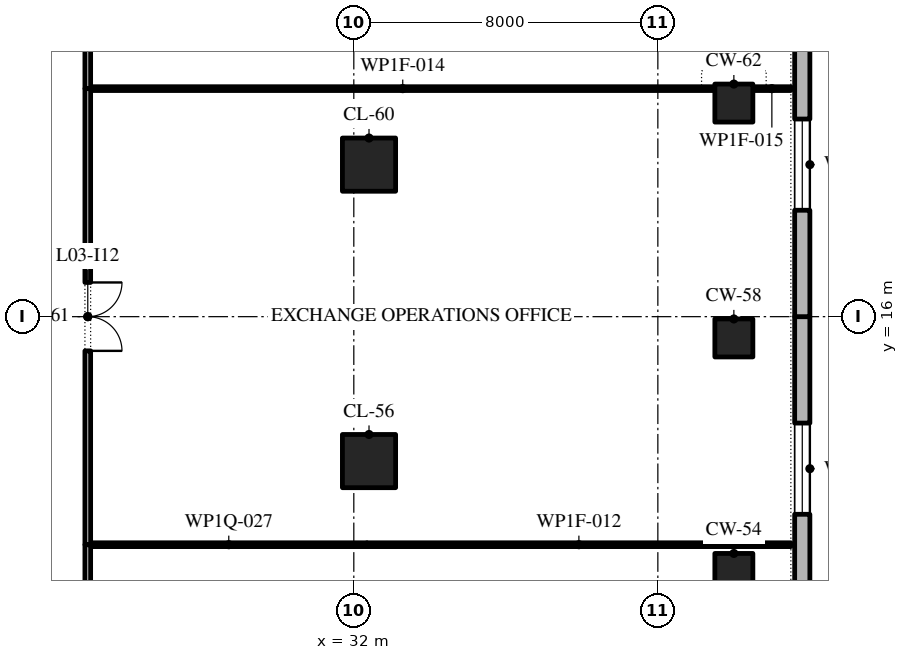
"""IFC4 building model, lengths in metres.
Left out: names, types, materials, properties, quantities, classifications, styles, units other than length and angle.
Written with IfcOpenShell. Run it as: python <this file> out.ifc"""

import sys

from ifc_helpers import new_model, si_unit, direction, frame, frame_2d, origin, origin_2d, place, context, subcontext, project, spatial, polyline, rectangle, outline, extrude, element, fill, save


model = new_model("IFC4")
c1 = context("Model", 3, precision=1e-05, world=origin(), true_north=direction((0.0, 1.0)))
c2 = subcontext(c1, "Body", "Model", "MODEL_VIEW")
j1 = project(units=[si_unit("LENGTHUNIT", "METRE"), si_unit("PLANEANGLEUNIT", "RADIAN")], contexts=[c1])
p1 = place(None, origin())
s1 = spatial("IfcSite", under=j1, at=p1, CompositionType="ELEMENT")
p2 = place(p1, origin())
s2 = spatial("IfcBuilding", under=s1, at=p2, CompositionType="ELEMENT")
p3 = place(p2, frame((0.0, 0.0, 19.2)))
s3 = spatial("IfcBuildingStorey", under=s2, at=p3, CompositionType="ELEMENT", Elevation=19.2)
p4 = place(p3, frame((42.0, 9.27, 0.0), z_axis=(0.0, 0.0, 1.0), x_axis=(1.0, 0.0, 0.0)))
e1 = element("IfcColumn", 1, at=p4, inside=s3, PredefinedType="COLUMN", context=c2, shape_type="SweptSolid", body=[
    extrude(rectangle(XDim=1.0, YDim=1.0, at=origin_2d()), origin(), (0.0, 0.0, 1.0), 4.8),
])
p5 = place(p3, frame((32.4, 12.2, 0.0), z_axis=(0.0, 0.0, 1.0), x_axis=(1.0, 0.0, 0.0)))
e2 = element("IfcColumn", 2, at=p5, inside=s3, PredefinedType="COLUMN", context=c2, shape_type="SweptSolid", body=[
    extrude(rectangle(XDim=1.4, YDim=1.4, at=origin_2d()), origin(), (0.0, 0.0, 1.0), 4.8),
])
p6 = place(p3, frame((42.0, 15.44, 0.0), z_axis=(0.0, 0.0, 1.0), x_axis=(1.0, 0.0, 0.0)))
e3 = element("IfcColumn", 3, at=p6, inside=s3, PredefinedType="COLUMN", context=c2, shape_type="SweptSolid", body=[
    extrude(rectangle(XDim=1.0, YDim=1.0, at=origin_2d()), origin(), (0.0, 0.0, 1.0), 4.8),
])
p7 = place(p3, frame((32.4, 20.0, 0.0), z_axis=(0.0, 0.0, 1.0), x_axis=(1.0, 0.0, 0.0)))
e4 = element("IfcColumn", 4, at=p7, inside=s3, PredefinedType="COLUMN", context=c2, shape_type="SweptSolid", body=[
    extrude(rectangle(XDim=1.4, YDim=1.4, at=origin_2d()), origin(), (0.0, 0.0, 1.0), 4.8),
])
p8 = place(p3, frame((42.0, 21.62, 0.0), z_axis=(0.0, 0.0, 1.0), x_axis=(1.0, 0.0, 0.0)))
e5 = element("IfcColumn", 5, at=p8, inside=s3, PredefinedType="COLUMN", context=c2, shape_type="SweptSolid", body=[
    extrude(rectangle(XDim=1.0, YDim=1.0, at=origin_2d()), origin(), (0.0, 0.0, 1.0), 4.8),
])
p9 = place(p3, frame((43.8, 8.0, 0.0), z_axis=(0.0, 0.0, 1.0), x_axis=(0.0, 1.0, 0.0)))
e6 = element("IfcWall", 6, at=p9, inside=s3, PredefinedType="STANDARD", context=c2, shape_type="SweptSolid", body=[
    extrude(rectangle(XDim=8.0, YDim=0.4, at=frame_2d((4.0, 0.0))), origin(), (0.0, 0.0, 1.0), 4.5),
])
p10 = place(p9, frame((2.8, 0.0, 0.9)))
e7 = element("IfcOpeningElement", 7, at=p10, cuts=e6, PredefinedType="OPENING", context=c2, shape_type="SweptSolid", body=[
    extrude(outline(polyline([(0.0, 0.0), (2.4, 0.0), (2.4, 1.5), (2.378, 1.758), (2.313, 2.009), (2.207, 2.245), (2.063, 2.46), (1.885, 2.648), (1.677, 2.804), (1.447, 2.922), (1.2, 3.0), (0.953, 2.922), (0.722, 2.804), (0.515, 2.648), (0.337, 2.46), (0.193, 2.245), (0.087, 2.009), (0.022, 1.758), (0.0, 1.5), (0.0, 0.0)])), frame((0.0, 0.21, 0.0), z_axis=(0.0, -1.0, 0.0), x_axis=(1.0, 0.0, 0.0)), (0.0, 0.0, 1.0), 0.42),
])
p11 = place(p3, frame((43.8, 16.0, 0.0), z_axis=(0.0, 0.0, 1.0), x_axis=(0.0, 1.0, 0.0)))
e8 = element("IfcWall", 8, at=p11, inside=s3, PredefinedType="STANDARD", context=c2, shape_type="SweptSolid", body=[
    extrude(rectangle(XDim=8.0, YDim=0.4, at=frame_2d((4.0, 0.0))), origin(), (0.0, 0.0, 1.0), 4.5),
])
p12 = place(p11, frame((2.8, 0.0, 0.9)))
e9 = element("IfcOpeningElement", 9, at=p12, cuts=e8, PredefinedType="OPENING", context=c2, shape_type="SweptSolid", body=[
    extrude(outline(polyline([(0.0, 0.0), (2.4, 0.0), (2.4, 1.5), (2.378, 1.758), (2.313, 2.009), (2.207, 2.245), (2.063, 2.46), (1.885, 2.648), (1.677, 2.804), (1.447, 2.922), (1.2, 3.0), (0.953, 2.922), (0.722, 2.804), (0.515, 2.648), (0.337, 2.46), (0.193, 2.245), (0.087, 2.009), (0.022, 1.758), (0.0, 1.5), (0.0, 0.0)])), frame((0.0, 0.21, 0.0), z_axis=(0.0, -1.0, 0.0), x_axis=(1.0, 0.0, 0.0)), (0.0, 0.0, 1.0), 0.42),
])
p13 = place(p3, frame((25.075, 10.0, 0.0), z_axis=(0.0, 0.0, 1.0), x_axis=(1.0, 0.0, 0.0)))
e10 = element("IfcWall", 10, at=p13, inside=s3, PredefinedType="PARTITIONING", context=c2, shape_type="SweptSolid", body=[
    extrude(rectangle(XDim=7.27, YDim=0.1, at=frame_2d((3.635, 0.0))), origin(), (0.0, 0.0, 1.0), 3.964),
])
p14 = place(p3, frame((25.075, 22.0, 0.0), z_axis=(0.0, 0.0, 1.0), x_axis=(1.0, 0.0, 0.0)))
e11 = element("IfcWall", 11, at=p14, inside=s3, PredefinedType="PARTITIONING", context=c2, shape_type="SweptSolid", body=[
    extrude(rectangle(XDim=16.425, YDim=0.1, at=frame_2d((8.212, 0.0))), origin(), (0.0, 0.0, 1.0), 4.5),
])
p15 = place(p3, frame((42.5, 22.0, 0.0), z_axis=(0.0, 0.0, 1.0), x_axis=(1.0, 0.0, 0.0)))
e12 = element("IfcWall", 12, at=p15, inside=s3, PredefinedType="PARTITIONING", context=c2, shape_type="SweptSolid", body=[
    extrude(rectangle(XDim=1.0, YDim=0.1, at=frame_2d((0.5, 0.0))), origin(), (0.0, 0.0, 1.0), 4.5),
])
p16 = place(p3, frame((25.0, -4.0, 0.0), z_axis=(0.0, 0.0, 1.0), x_axis=(0.0, 1.0, 0.0)))
e13 = element("IfcWall", 13, at=p16, inside=s3, PredefinedType="PARTITIONING", context=c2, shape_type="SweptSolid", body=[
    extrude(rectangle(XDim=14.0, YDim=0.15, at=frame_2d((7.0, 0.0))), origin(), (0.0, 0.0, 1.0), 4.5),
])
p17 = place(p16, frame((6.1, 0.0, 0.0)))
e14 = element("IfcOpeningElement", 14, at=p17, cuts=e13, PredefinedType="OPENING", context=c2, shape_type="SweptSolid", body=[
    extrude(rectangle(XDim=1.8, YDim=2.1, at=frame_2d((0.9, 1.05))), frame((0.0, 0.085, 0.0), z_axis=(0.0, -1.0, 0.0), x_axis=(1.0, 0.0, 0.0)), (0.0, 0.0, 1.0), 0.17),
])
p18 = place(p3, frame((25.0, 10.0, 0.0), z_axis=(0.0, 0.0, 1.0), x_axis=(0.0, 1.0, 0.0)))
e15 = element("IfcWall", 15, at=p18, inside=s3, PredefinedType="PARTITIONING", context=c2, shape_type="SweptSolid", body=[
    extrude(rectangle(XDim=12.0, YDim=0.15, at=frame_2d((6.0, 0.0))), origin(), (0.0, 0.0, 1.0), 4.5),
])
p19 = place(p18, frame((5.1, 0.0, 0.0)))
e16 = element("IfcOpeningElement", 16, at=p19, cuts=e15, PredefinedType="OPENING", context=c2, shape_type="SweptSolid", body=[
    extrude(rectangle(XDim=1.8, YDim=2.1, at=frame_2d((0.9, 1.05))), frame((0.0, 0.085, 0.0), z_axis=(0.0, -1.0, 0.0), x_axis=(1.0, 0.0, 0.0)), (0.0, 0.0, 1.0), 0.17),
])
p20 = place(p3, frame((25.0, 22.0, 0.0), z_axis=(0.0, 0.0, 1.0), x_axis=(0.0, 1.0, 0.0)))
e17 = element("IfcWall", 17, at=p20, inside=s3, PredefinedType="PARTITIONING", context=c2, shape_type="SweptSolid", body=[
    extrude(rectangle(XDim=4.0, YDim=0.15, at=frame_2d((2.0, 0.0))), origin(), (0.0, 0.0, 1.0), 4.5),
])
p21 = place(p20, frame((1.5, 0.0, 0.0)))
e18 = element("IfcOpeningElement", 18, at=p21, cuts=e17, PredefinedType="OPENING", context=c2, shape_type="SweptSolid", body=[
    extrude(rectangle(XDim=1.0, YDim=2.1, at=frame_2d((0.5, 1.05))), frame((0.0, 0.085, 0.0), z_axis=(0.0, -1.0, 0.0), x_axis=(1.0, 0.0, 0.0)), (0.0, 0.0, 1.0), 0.17),
])
p22 = place(p3, frame((32.345, 10.0, 0.0), z_axis=(0.0, 0.0, 1.0), x_axis=(1.0, 0.0, 0.0)))
e19 = element("IfcWall", 19, at=p22, inside=s3, PredefinedType="PARTITIONING", context=c2, shape_type="SweptSolid", body=[
    extrude(rectangle(XDim=11.155, YDim=0.1, at=frame_2d((5.578, 0.0))), origin(), (0.0, 0.0, 1.0), 4.5),
])
p23 = place(p10, origin())
e20 = element("IfcWindow", 20, at=p23, inside=s3, PartitioningType="DOUBLE_PANEL_VERTICAL", PredefinedType="WINDOW", context=c2, shape_type="SweptSolid", body=[
    extrude(outline(polyline([(0.0, 0.0), (2.4, 0.0), (2.4, 1.5), (2.378, 1.758), (2.313, 2.009), (2.207, 2.245), (2.063, 2.46), (1.885, 2.648), (1.677, 2.804), (1.447, 2.922), (1.2, 3.0), (0.953, 2.922), (0.722, 2.804), (0.515, 2.648), (0.337, 2.46), (0.193, 2.245), (0.087, 2.009), (0.022, 1.758), (0.0, 1.5), (0.0, 0.0)])), frame((0.0, 0.03, 0.0), z_axis=(0.0, -1.0, 0.0), x_axis=(1.0, 0.0, 0.0)), (0.0, 0.0, 1.0), 0.06),
])
fill(e7, e20)
p24 = place(p12, origin())
e21 = element("IfcWindow", 21, at=p24, inside=s3, PartitioningType="DOUBLE_PANEL_VERTICAL", PredefinedType="WINDOW", context=c2, shape_type="SweptSolid", body=[
    extrude(outline(polyline([(0.0, 0.0), (2.4, 0.0), (2.4, 1.5), (2.378, 1.758), (2.313, 2.009), (2.207, 2.245), (2.063, 2.46), (1.885, 2.648), (1.677, 2.804), (1.447, 2.922), (1.2, 3.0), (0.953, 2.922), (0.722, 2.804), (0.515, 2.648), (0.337, 2.46), (0.193, 2.245), (0.087, 2.009), (0.022, 1.758), (0.0, 1.5), (0.0, 0.0)])), frame((0.0, 0.03, 0.0), z_axis=(0.0, -1.0, 0.0), x_axis=(1.0, 0.0, 0.0)), (0.0, 0.0, 1.0), 0.06),
])
fill(e9, e21)
p25 = place(p19, frame((1.8, 0.0, 0.0), z_axis=(0.0, 0.0, 1.0), x_axis=(-1.0, 0.0, 0.0)))
e22 = element("IfcDoor", 22, at=p25, inside=s3, OperationType="SINGLE_SWING_LEFT", PredefinedType="DOOR", context=c2, shape_type="SweptSolid", body=[
    extrude(rectangle(XDim=1.8, YDim=2.1, at=frame_2d((0.9, 1.05))), frame((0.0, 0.025, 0.0), z_axis=(0.0, -1.0, 0.0), x_axis=(1.0, 0.0, 0.0)), (0.0, 0.0, 1.0), 0.05),
])
fill(e16, e22)
save(model, sys.argv[1])
